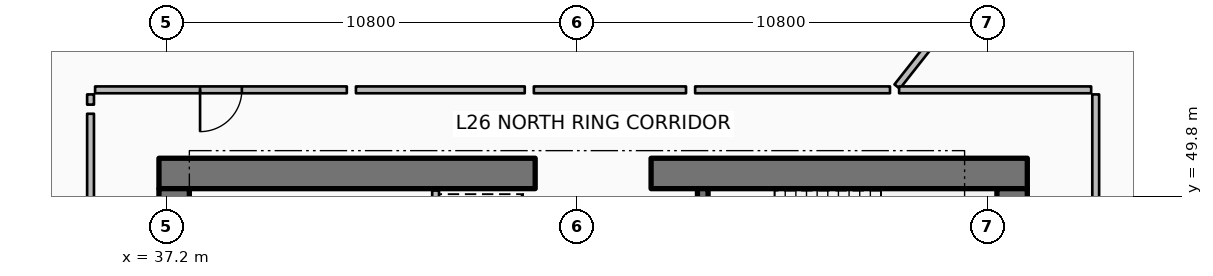
"""IFC4 building model, lengths in metres.
Left out: names, types, materials, properties, quantities, classifications, styles, units other than length and angle.
Written with IfcOpenShell. Run it as: python <this file> out.ifc"""

import sys

from ifc_helpers import new_model, si_unit, direction, frame, frame_2d, origin, place, context, subcontext, project, spatial, rectangle, extrude, element, fill, save


model = new_model("IFC4")
c1 = context("Model", 3, precision=1e-05, world=origin(), true_north=direction((0.0, 1.0)))
c2 = subcontext(c1, "Body", "Model", "MODEL_VIEW")
j1 = project(units=[si_unit("LENGTHUNIT", "METRE"), si_unit("PLANEANGLEUNIT", "RADIAN")], contexts=[c1])
p1 = place(None, origin())
s1 = spatial("IfcSite", under=j1, at=p1, CompositionType="ELEMENT")
p2 = place(p1, origin())
s2 = spatial("IfcBuilding", under=s1, at=p2, CompositionType="ELEMENT")
p3 = place(p2, frame((0.0, 0.0, 105.15)))
s3 = spatial("IfcBuildingStorey", under=s2, at=p3, CompositionType="ELEMENT", Elevation=105.15)
p4 = place(p3, frame((37.0, 50.4, 0.0), z_axis=(0.0, 0.0, 1.0), x_axis=(1.0, 0.0, 0.0)))
e1 = element("IfcWall", 1, at=p4, inside=s3, PredefinedType="SHEAR", context=c2, shape_type="SweptSolid", body=[
    extrude(rectangle(XDim=9.9, YDim=0.8, at=frame_2d((4.95, 0.0))), origin(), (0.0, 0.0, 1.0), 3.75),
])
p5 = place(p3, frame((49.95, 50.4, 0.0), z_axis=(0.0, 0.0, 1.0), x_axis=(1.0, 0.0, 0.0)))
e2 = element("IfcWall", 2, at=p5, inside=s3, PredefinedType="SHEAR", context=c2, shape_type="SweptSolid", body=[
    extrude(rectangle(XDim=9.9, YDim=0.8, at=frame_2d((4.95, 0.0))), origin(), (0.0, 0.0, 1.0), 3.75),
])
for number, where, z_axis, x_axis in (
    (3, (37.4, 34.0, 0.0), (0.0, 0.0, 1.0), (0.0, 1.0, 0.0)),
    (4, (59.45, 34.0, 0.0), (0.0, 0.0, 1.0), (0.0, 1.0, 0.0)),
):
    element("IfcWall", number, at=place(p3, frame(where, z_axis=z_axis, x_axis=x_axis)), inside=s3, PredefinedType="SHEAR", context=c2, shape_type="SweptSolid", body=[
        extrude(rectangle(XDim=16.0, YDim=0.8, at=frame_2d((8.0, 0.0))), origin(), (0.0, 0.0, 1.0), 3.75),
    ])
p6 = place(p3, frame((51.31, 46.5, 0.0), z_axis=(0.0, 0.0, 1.0), x_axis=(0.0, 1.0, 0.0)))
e5 = element("IfcWall", 5, at=p6, inside=s3, PredefinedType="SHEAR", context=c2, shape_type="SweptSolid", body=[
    extrude(rectangle(XDim=3.5, YDim=0.28, at=frame_2d((1.75, 0.0))), origin(), (0.0, 0.0, 1.0), 3.75),
])
p7 = place(p3, frame((44.28, 47.82, 0.0), z_axis=(0.0, 0.0, 1.0), x_axis=(0.0, 1.0, 0.0)))
e6 = element("IfcWall", 6, at=p7, inside=s3, PredefinedType="PARTITIONING", context=c2, shape_type="SweptSolid", body=[
    extrude(rectangle(XDim=2.13, YDim=0.18, at=frame_2d((1.065, 0.0))), origin(), (0.0, 0.0, 1.0), 3.5),
])
p8 = place(p3, frame((56.425, 52.686, 0.0), z_axis=(0.0, 0.0, 1.0), x_axis=(0.619083417853, 0.785325233098, 0.0)))
e7 = element("IfcWall", 7, at=p8, inside=s3, PredefinedType="PARTITIONING", context=c2, shape_type="SweptSolid", body=[
    extrude(rectangle(XDim=15.063, YDim=0.18, at=frame_2d((7.532, 0.0))), origin(), (0.0, 0.0, 1.0), 2.94),
])
p9 = place(p3, frame((41.944, 52.6, 0.0), z_axis=(0.0, 0.0, 1.0), x_axis=(-1.0, 0.0, 0.0)))
e8 = element("IfcWall", 8, at=p9, inside=s3, PredefinedType="PARTITIONING", context=c2, shape_type="SweptSolid", body=[
    extrude(rectangle(XDim=6.624, YDim=0.18, at=frame_2d((3.312, 0.0))), origin(), (0.0, 0.0, 1.0), 2.94),
])
p10 = place(p9, frame((2.762, 0.0, 0.0)))
e9 = element("IfcOpeningElement", 9, at=p10, cuts=e8, PredefinedType="OPENING", context=c2, shape_type="SweptSolid", body=[
    extrude(rectangle(XDim=1.1, YDim=2.1, at=frame_2d((0.55, 1.05))), frame((0.0, 0.1, 0.0), z_axis=(0.0, -1.0, 0.0), x_axis=(1.0, 0.0, 0.0)), (0.0, 0.0, 1.0), 0.2),
])
p11 = place(p3, frame((35.2, 52.48, 0.0), z_axis=(0.0, 0.0, 1.0), x_axis=(0.0, -1.0, 0.0)))
e10 = element("IfcWall", 10, at=p11, inside=s3, PredefinedType="PARTITIONING", context=c2, shape_type="SweptSolid", body=[
    extrude(rectangle(XDim=0.269, YDim=0.18, at=frame_2d((0.135, 0.0))), origin(), (0.0, 0.0, 1.0), 2.94),
])
p12 = place(p3, frame((56.236, 52.6, 0.0), z_axis=(0.0, 0.0, 1.0), x_axis=(-1.0, 0.0, 0.0)))
e11 = element("IfcWall", 11, at=p12, inside=s3, PredefinedType="PARTITIONING", context=c2, shape_type="SweptSolid", body=[
    extrude(rectangle(XDim=5.127, YDim=0.18, at=frame_2d((2.563, 0.0))), origin(), (0.0, 0.0, 1.0), 2.94),
])
p13 = place(p3, frame((50.869, 52.6, 0.0), z_axis=(0.0, 0.0, 1.0), x_axis=(-1.0, 0.0, 0.0)))
e12 = element("IfcWall", 12, at=p13, inside=s3, PredefinedType="PARTITIONING", context=c2, shape_type="SweptSolid", body=[
    extrude(rectangle(XDim=4.004, YDim=0.18, at=frame_2d((2.002, 0.0))), origin(), (0.0, 0.0, 1.0), 2.94),
])
p14 = place(p3, frame((46.625, 52.6, 0.0), z_axis=(0.0, 0.0, 1.0), x_axis=(-1.0, 0.0, 0.0)))
e13 = element("IfcWall", 13, at=p14, inside=s3, PredefinedType="PARTITIONING", context=c2, shape_type="SweptSolid", body=[
    extrude(rectangle(XDim=4.442, YDim=0.18, at=frame_2d((2.221, 0.0))), origin(), (0.0, 0.0, 1.0), 2.94),
])
p15 = place(p3, frame((35.2, 51.971, 0.0), z_axis=(0.0, 0.0, 1.0), x_axis=(0.0, -1.0, 0.0)))
e14 = element("IfcWall", 14, at=p15, inside=s3, PredefinedType="PARTITIONING", context=c2, shape_type="SweptSolid", body=[
    extrude(rectangle(XDim=6.241, YDim=0.18, at=frame_2d((3.12, 0.0))), origin(), (0.0, 0.0, 1.0), 2.94),
])
p16 = place(p3, frame((61.65, 49.764, 0.0), z_axis=(0.0, 0.0, 1.0), x_axis=(0.0, 1.0, 0.0)))
e15 = element("IfcWall", 15, at=p16, inside=s3, PredefinedType="PARTITIONING", context=c2, shape_type="SweptSolid", body=[
    extrude(rectangle(XDim=2.716, YDim=0.18, at=frame_2d((1.358, 0.0))), origin(), (0.0, 0.0, 1.0), 2.94),
])
p17 = place(p3, frame((61.53, 52.6, 0.0), z_axis=(0.0, 0.0, 1.0), x_axis=(-1.0, 0.0, 0.0)))
e16 = element("IfcWall", 16, at=p17, inside=s3, PredefinedType="PARTITIONING", context=c2, shape_type="SweptSolid", body=[
    extrude(rectangle(XDim=5.054, YDim=0.18, at=frame_2d((2.527, 0.0))), origin(), (0.0, 0.0, 1.0), 2.94),
])
p18 = place(p10, origin())
e17 = element("IfcDoor", 17, at=p18, inside=s3, OperationType="SINGLE_SWING_RIGHT", PredefinedType="DOOR", context=c2, shape_type="SweptSolid", body=[
    extrude(rectangle(XDim=1.1, YDim=2.1, at=frame_2d((0.55, 1.05))), frame((0.0, 0.025, 0.0), z_axis=(0.0, -1.0, 0.0), x_axis=(1.0, 0.0, 0.0)), (0.0, 0.0, 1.0), 0.05),
])
fill(e9, e17)
save(model, sys.argv[1])
